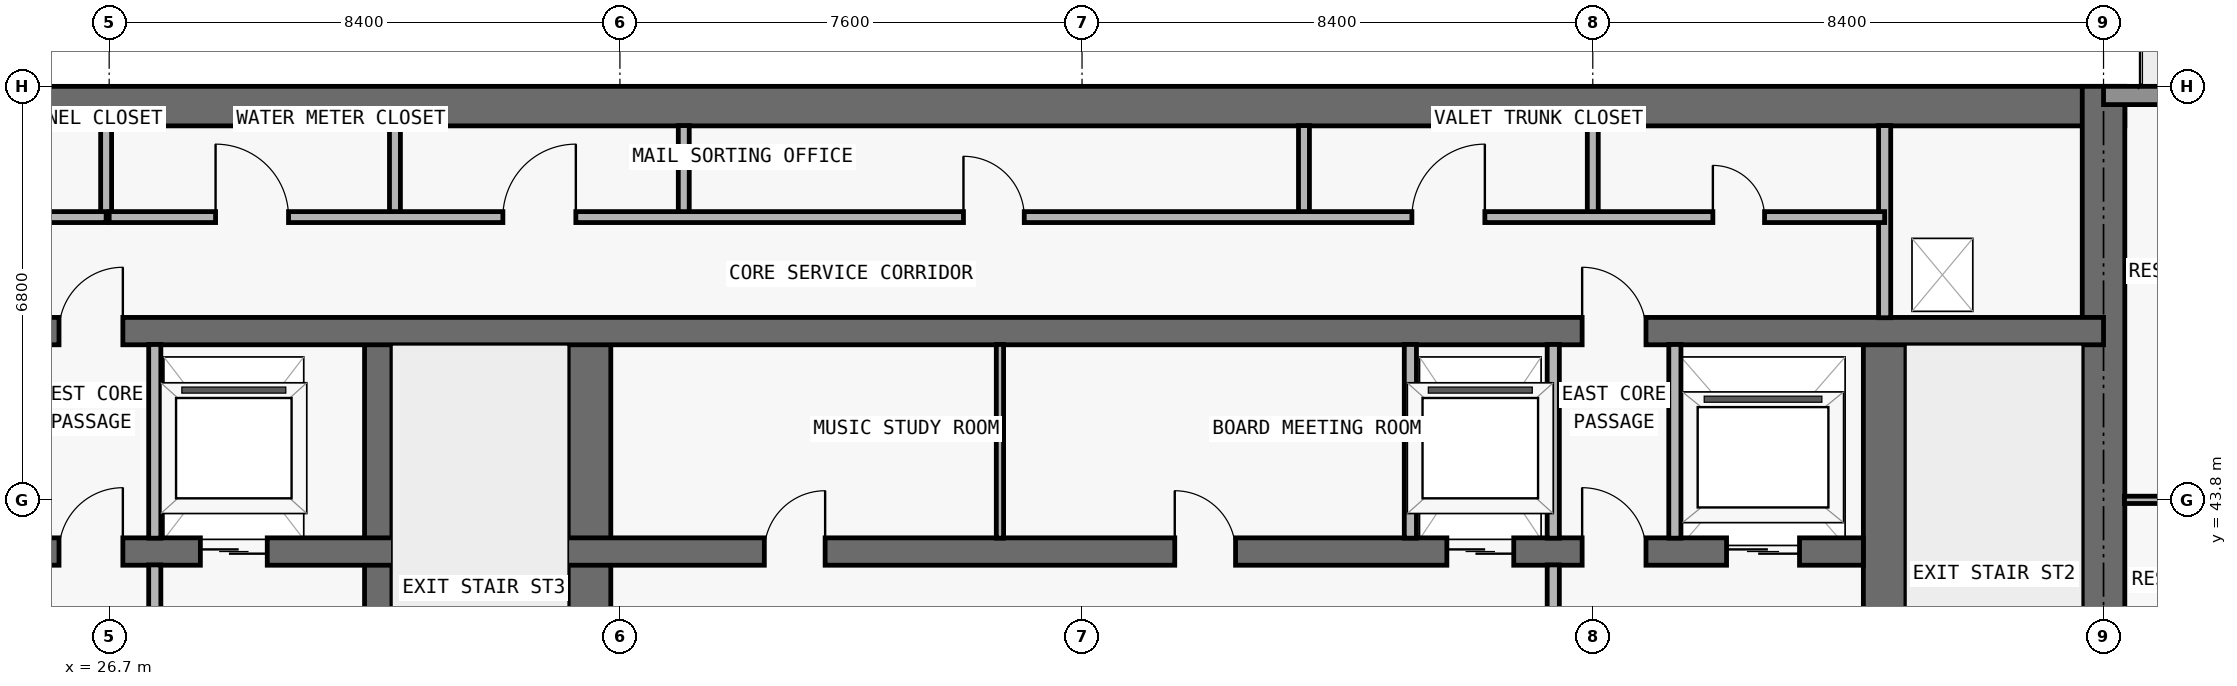
"""IFC4 building model, lengths in metres.
Left out: names, types, materials, properties, quantities, classifications, styles, units other than length and angle.
Written with IfcOpenShell. Run it as: python <this file> out.ifc"""

import sys

from ifc_helpers import new_model, si_unit, direction, frame, frame_2d, origin, place, context, subcontext, project, spatial, rectangle, extrude, element, fill, save


model = new_model("IFC4")
c1 = context("Model", 3, precision=1e-05, world=origin(), true_north=direction((0.0, 1.0)))
c2 = subcontext(c1, "Body", "Model", "MODEL_VIEW")
j1 = project(units=[si_unit("LENGTHUNIT", "METRE"), si_unit("PLANEANGLEUNIT", "RADIAN")], contexts=[c1])
p1 = place(None, origin())
s1 = spatial("IfcSite", under=j1, at=p1, CompositionType="ELEMENT")
p2 = place(p1, origin())
s2 = spatial("IfcBuilding", under=s1, at=p2, CompositionType="ELEMENT")
p3 = place(p2, frame((0.0, 0.0, 249.6)))
s3 = spatial("IfcBuildingStorey", under=s2, at=p3, CompositionType="ELEMENT", Elevation=249.6)
p4 = place(p3, frame((17.95, 50.275, 0.0), z_axis=(0.0, 0.0, 1.0), x_axis=(1.0, 0.0, 0.0)))
e1 = element("IfcWall", 1, at=p4, inside=s3, PredefinedType="SHEAR", context=c2, shape_type="SweptSolid", body=[
    extrude(rectangle(XDim=41.9, YDim=0.65, at=frame_2d((20.95, 0.0))), origin(), (0.0, 0.0, 1.0), 3.05),
])
p5 = place(p3, frame((59.5, 36.65, 0.0), z_axis=(0.0, 0.0, 1.0), x_axis=(0.0, 1.0, 0.0)))
e2 = element("IfcWall", 2, at=p5, inside=s3, PredefinedType="SHEAR", context=c2, shape_type="SweptSolid", body=[
    extrude(rectangle(XDim=13.95, YDim=0.7, at=frame_2d((6.975, 0.0))), origin(), (0.0, 0.0, 1.0), 3.05),
])
p6 = place(p3, frame((55.9, 37.0, 0.0), z_axis=(0.0, 0.0, 1.0), x_axis=(0.0, 1.0, 0.0)))
e3 = element("IfcWall", 3, at=p6, inside=s3, PredefinedType="SHEAR", context=c2, shape_type="SweptSolid", body=[
    extrude(rectangle(XDim=9.575, YDim=0.7, at=frame_2d((4.788, 0.0))), origin(), (0.0, 0.0, 1.0), 3.05),
])
p7 = place(p6, frame((0.55, 0.0, 0.0)))
e4 = element("IfcOpeningElement", 4, at=p7, cuts=e3, PredefinedType="OPENING", context=c2, shape_type="SweptSolid", body=[
    extrude(rectangle(XDim=1.1, YDim=2.15, at=frame_2d((0.55, 1.075))), frame((0.0, 0.36, 0.0), z_axis=(0.0, -1.0, 0.0), x_axis=(1.0, 0.0, 0.0)), (0.0, 0.0, 1.0), 0.72),
])
p8 = place(p3, frame((31.125, 37.0, 0.0), z_axis=(0.0, 0.0, 1.0), x_axis=(0.0, 1.0, 0.0)))
e5 = element("IfcWall", 5, at=p8, inside=s3, PredefinedType="SHEAR", context=c2, shape_type="SweptSolid", body=[
    extrude(rectangle(XDim=9.575, YDim=0.45, at=frame_2d((4.788, 0.0))), origin(), (0.0, 0.0, 1.0), 3.05),
])
p9 = place(p3, frame((34.6, 37.0, 0.0), z_axis=(0.0, 0.0, 1.0), x_axis=(0.0, 1.0, 0.0)))
e6 = element("IfcWall", 6, at=p9, inside=s3, PredefinedType="SHEAR", context=c2, shape_type="SweptSolid", body=[
    extrude(rectangle(XDim=9.575, YDim=0.7, at=frame_2d((4.788, 0.0))), origin(), (0.0, 0.0, 1.0), 3.05),
])
p10 = place(p3, frame((22.25, 42.95, 0.0), z_axis=(0.0, 0.0, 1.0), x_axis=(1.0, 0.0, 0.0)))
e7 = element("IfcWall", 7, at=p10, inside=s3, PredefinedType="SHEAR", context=c2, shape_type="SweptSolid", body=[
    extrude(rectangle(XDim=33.3, YDim=0.45, at=frame_2d((16.65, 0.0))), origin(), (0.0, 0.0, 1.0), 3.05),
])
p11 = place(p10, frame((1.05, 0.0, 0.0)))
e8 = element("IfcOpeningElement", 8, at=p11, cuts=e7, PredefinedType="OPENING", context=c2, shape_type="SweptSolid", body=[
    extrude(rectangle(XDim=1.2, YDim=2.2, at=frame_2d((0.6, 1.1))), frame((0.0, 0.235, 0.0), z_axis=(0.0, -1.0, 0.0), x_axis=(1.0, 0.0, 0.0)), (0.0, 0.0, 1.0), 0.47),
])
p12 = place(p10, frame((31.05, 0.0, 0.0)))
e9 = element("IfcOpeningElement", 9, at=p12, cuts=e7, PredefinedType="OPENING", context=c2, shape_type="SweptSolid", body=[
    extrude(rectangle(XDim=1.2, YDim=2.2, at=frame_2d((0.6, 1.1))), frame((0.0, 0.235, 0.0), z_axis=(0.0, -1.0, 0.0), x_axis=(1.0, 0.0, 0.0)), (0.0, 0.0, 1.0), 0.47),
])
p13 = place(p10, frame((26.45, 0.0, 0.0)))
e10 = element("IfcOpeningElement", 10, at=p13, cuts=e7, PredefinedType="OPENING", context=c2, shape_type="SweptSolid", body=[
    extrude(rectangle(XDim=1.1, YDim=2.2, at=frame_2d((0.55, 1.1))), frame((0.0, 0.235, 0.0), z_axis=(0.0, -1.0, 0.0), x_axis=(1.0, 0.0, 0.0)), (0.0, 0.0, 1.0), 0.47),
])
p14 = place(p10, frame((5.95, 0.0, 0.0)))
e11 = element("IfcOpeningElement", 11, at=p14, cuts=e7, PredefinedType="OPENING", context=c2, shape_type="SweptSolid", body=[
    extrude(rectangle(XDim=1.1, YDim=2.2, at=frame_2d((0.55, 1.1))), frame((0.0, 0.235, 0.0), z_axis=(0.0, -1.0, 0.0), x_axis=(1.0, 0.0, 0.0)), (0.0, 0.0, 1.0), 0.47),
])
p15 = place(p10, frame((3.625, 0.0, 0.0)))
e12 = element("IfcOpeningElement", 12, at=p15, cuts=e7, PredefinedType="OPENING", context=c2, shape_type="SweptSolid", body=[
    extrude(rectangle(XDim=1.05, YDim=2.15, at=frame_2d((0.525, 1.075))), frame((0.0, 0.235, 0.0), z_axis=(0.0, -1.0, 0.0), x_axis=(1.0, 0.0, 0.0)), (0.0, 0.0, 1.0), 0.47),
])
p16 = place(p10, frame((28.675, 0.0, 0.0)))
e13 = element("IfcOpeningElement", 13, at=p16, cuts=e7, PredefinedType="OPENING", context=c2, shape_type="SweptSolid", body=[
    extrude(rectangle(XDim=1.05, YDim=2.15, at=frame_2d((0.525, 1.075))), frame((0.0, 0.235, 0.0), z_axis=(0.0, -1.0, 0.0), x_axis=(1.0, 0.0, 0.0)), (0.0, 0.0, 1.0), 0.47),
])
p17 = place(p10, frame((15.225, 0.0, 0.0)))
e14 = element("IfcOpeningElement", 14, at=p17, cuts=e7, PredefinedType="OPENING", context=c2, shape_type="SweptSolid", body=[
    extrude(rectangle(XDim=1.0, YDim=2.2, at=frame_2d((0.5, 1.1))), frame((0.0, 0.235, 0.0), z_axis=(0.0, -1.0, 0.0), x_axis=(1.0, 0.0, 0.0)), (0.0, 0.0, 1.0), 0.47),
])
p18 = place(p10, frame((21.975, 0.0, 0.0)))
e15 = element("IfcOpeningElement", 15, at=p18, cuts=e7, PredefinedType="OPENING", context=c2, shape_type="SweptSolid", body=[
    extrude(rectangle(XDim=1.0, YDim=2.2, at=frame_2d((0.5, 1.1))), frame((0.0, 0.235, 0.0), z_axis=(0.0, -1.0, 0.0), x_axis=(1.0, 0.0, 0.0)), (0.0, 0.0, 1.0), 0.47),
])
p19 = place(p3, frame((18.3, 46.575, 0.0), z_axis=(0.0, 0.0, 1.0), x_axis=(1.0, 0.0, 0.0)))
e16 = element("IfcWall", 16, at=p19, inside=s3, PredefinedType="SHEAR", context=c2, shape_type="SweptSolid", body=[
    extrude(rectangle(XDim=41.2, YDim=0.45, at=frame_2d((20.6, 0.0))), origin(), (0.0, 0.0, 1.0), 3.05),
])
p20 = place(p19, frame((7.575, 0.0, 0.0)))
e17 = element("IfcOpeningElement", 17, at=p20, cuts=e16, PredefinedType="OPENING", context=c2, shape_type="SweptSolid", body=[
    extrude(rectangle(XDim=1.05, YDim=2.15, at=frame_2d((0.525, 1.075))), frame((0.0, 0.235, 0.0), z_axis=(0.0, -1.0, 0.0), x_axis=(1.0, 0.0, 0.0)), (0.0, 0.0, 1.0), 0.47),
])
p21 = place(p19, frame((32.625, 0.0, 0.0)))
e18 = element("IfcOpeningElement", 18, at=p21, cuts=e16, PredefinedType="OPENING", context=c2, shape_type="SweptSolid", body=[
    extrude(rectangle(XDim=1.05, YDim=2.15, at=frame_2d((0.525, 1.075))), frame((0.0, 0.235, 0.0), z_axis=(0.0, -1.0, 0.0), x_axis=(1.0, 0.0, 0.0)), (0.0, 0.0, 1.0), 0.47),
])
p22 = place(p3, frame((59.5, 50.45, 0.0), z_axis=(0.0, 0.0, 1.0), x_axis=(1.0, 0.0, 0.0)))
e19 = element("IfcWall", 19, at=p22, inside=s3, PredefinedType="STANDARD", context=c2, shape_type="SweptSolid", body=[
    extrude(rectangle(XDim=6.2, YDim=0.3, at=frame_2d((3.1, 0.0))), origin(), (0.0, 0.0, 1.0), 3.05),
])
p23 = place(p22, frame((2.1, 0.0, 0.0)))
e20 = element("IfcOpeningElement", 20, at=p23, cuts=e19, PredefinedType="OPENING", context=c2, shape_type="SweptSolid", body=[
    extrude(rectangle(XDim=2.0, YDim=2.3, at=frame_2d((1.0, 1.15))), frame((0.0, 0.16, 0.0), z_axis=(0.0, -1.0, 0.0), x_axis=(1.0, 0.0, 0.0)), (0.0, 0.0, 1.0), 0.32),
])
p24 = place(p3, frame((26.65, 48.45, 0.0), z_axis=(0.0, 0.0, 1.0), x_axis=(0.0, 1.0, 0.0)))
e21 = element("IfcWall", 21, at=p24, inside=s3, PredefinedType="PARTITIONING", context=c2, shape_type="SweptSolid", body=[
    extrude(rectangle(XDim=1.505, YDim=0.18, at=frame_2d((0.752, 0.0))), origin(), (0.0, 0.0, 1.0), 3.05),
])
p25 = place(p3, frame((27.45, 37.345, 0.0), z_axis=(0.0, 0.0, 1.0), x_axis=(0.0, 1.0, 0.0)))
e22 = element("IfcWall", 22, at=p25, inside=s3, PredefinedType="PARTITIONING", context=c2, shape_type="SweptSolid", body=[
    extrude(rectangle(XDim=5.385, YDim=0.2, at=frame_2d((2.692, 0.0))), origin(), (0.0, 0.0, 1.0), 3.05),
])
p26 = place(p3, frame((27.45, 43.17, 0.0), z_axis=(0.0, 0.0, 1.0), x_axis=(0.0, 1.0, 0.0)))
e23 = element("IfcWall", 23, at=p26, inside=s3, PredefinedType="PARTITIONING", context=c2, shape_type="SweptSolid", body=[
    extrude(rectangle(XDim=3.185, YDim=0.2, at=frame_2d((1.593, 0.0))), origin(), (0.0, 0.0, 1.0), 3.05),
])
for number, where, z_axis, x_axis in (
    (24, (31.4, 48.45, 0.0), (0.0, 0.0, 1.0), (0.0, 1.0, 0.0)),
    (25, (36.15, 48.45, 0.0), (0.0, 0.0, 1.0), (0.0, 1.0, 0.0)),
):
    element("IfcWall", number, at=place(p3, frame(where, z_axis=z_axis, x_axis=x_axis)), inside=s3, PredefinedType="PARTITIONING", context=c2, shape_type="SweptSolid", body=[
        extrude(rectangle(XDim=1.505, YDim=0.18, at=frame_2d((0.752, 0.0))), origin(), (0.0, 0.0, 1.0), 3.05),
    ])
p27 = place(p3, frame((41.35, 43.17, 0.0), z_axis=(0.0, 0.0, 1.0), x_axis=(0.0, 1.0, 0.0)))
e26 = element("IfcWall", 26, at=p27, inside=s3, PredefinedType="PARTITIONING", context=c2, shape_type="SweptSolid", body=[
    extrude(rectangle(XDim=3.185, YDim=0.12, at=frame_2d((1.593, 0.0))), origin(), (0.0, 0.0, 1.0), 3.05),
])
p28 = place(p3, frame((46.35, 48.45, 0.0), z_axis=(0.0, 0.0, 1.0), x_axis=(0.0, 1.0, 0.0)))
e27 = element("IfcWall", 27, at=p28, inside=s3, PredefinedType="PARTITIONING", context=c2, shape_type="SweptSolid", body=[
    extrude(rectangle(XDim=1.505, YDim=0.18, at=frame_2d((0.752, 0.0))), origin(), (0.0, 0.0, 1.0), 3.05),
])
p29 = place(p3, frame((48.1, 43.17, 0.0), z_axis=(0.0, 0.0, 1.0), x_axis=(0.0, 1.0, 0.0)))
e28 = element("IfcWall", 28, at=p29, inside=s3, PredefinedType="PARTITIONING", context=c2, shape_type="SweptSolid", body=[
    extrude(rectangle(XDim=3.185, YDim=0.2, at=frame_2d((1.593, 0.0))), origin(), (0.0, 0.0, 1.0), 3.05),
])
p30 = place(p3, frame((50.45, 37.345, 0.0), z_axis=(0.0, 0.0, 1.0), x_axis=(0.0, 1.0, 0.0)))
e29 = element("IfcWall", 29, at=p30, inside=s3, PredefinedType="PARTITIONING", context=c2, shape_type="SweptSolid", body=[
    extrude(rectangle(XDim=5.385, YDim=0.2, at=frame_2d((2.692, 0.0))), origin(), (0.0, 0.0, 1.0), 3.05),
])
p31 = place(p3, frame((50.45, 43.17, 0.0), z_axis=(0.0, 0.0, 1.0), x_axis=(0.0, 1.0, 0.0)))
e30 = element("IfcWall", 30, at=p31, inside=s3, PredefinedType="PARTITIONING", context=c2, shape_type="SweptSolid", body=[
    extrude(rectangle(XDim=3.185, YDim=0.2, at=frame_2d((1.593, 0.0))), origin(), (0.0, 0.0, 1.0), 3.05),
])
p32 = place(p3, frame((51.1, 48.45, 0.0), z_axis=(0.0, 0.0, 1.0), x_axis=(0.0, 1.0, 0.0)))
e31 = element("IfcWall", 31, at=p32, inside=s3, PredefinedType="PARTITIONING", context=c2, shape_type="SweptSolid", body=[
    extrude(rectangle(XDim=1.505, YDim=0.18, at=frame_2d((0.752, 0.0))), origin(), (0.0, 0.0, 1.0), 3.05),
])
p33 = place(p3, frame((52.45, 43.17, 0.0), z_axis=(0.0, 0.0, 1.0), x_axis=(0.0, 1.0, 0.0)))
e32 = element("IfcWall", 32, at=p33, inside=s3, PredefinedType="PARTITIONING", context=c2, shape_type="SweptSolid", body=[
    extrude(rectangle(XDim=3.185, YDim=0.2, at=frame_2d((1.593, 0.0))), origin(), (0.0, 0.0, 1.0), 3.05),
])
p34 = place(p3, frame((55.9, 46.795, 0.0), z_axis=(0.0, 0.0, 1.0), x_axis=(0.0, 1.0, 0.0)))
e33 = element("IfcWall", 33, at=p34, inside=s3, PredefinedType="PARTITIONING", context=c2, shape_type="SweptSolid", body=[
    extrude(rectangle(XDim=3.16, YDim=0.2, at=frame_2d((1.58, 0.0))), origin(), (0.0, 0.0, 1.0), 3.05),
])
p35 = place(p3, frame((59.845, 43.8, 0.0), z_axis=(0.0, 0.0, 1.0), x_axis=(1.0, 0.0, 0.0)))
e34 = element("IfcWall", 34, at=p35, inside=s3, PredefinedType="PARTITIONING", context=c2, shape_type="SweptSolid", body=[
    extrude(rectangle(XDim=9.56, YDim=0.12, at=frame_2d((4.78, 0.0))), origin(), (0.0, 0.0, 1.0), 2.418),
])
p36 = place(p35, frame((3.63, 0.0, 0.0)))
e35 = element("IfcOpeningElement", 35, at=p36, cuts=e34, PredefinedType="OPENING", context=c2, shape_type="SweptSolid", body=[
    extrude(rectangle(XDim=0.9, YDim=2.15, at=frame_2d((0.45, 1.075))), frame((0.0, 0.07, 0.0), z_axis=(0.0, -1.0, 0.0), x_axis=(1.0, 0.0, 0.0)), (0.0, 0.0, 1.0), 0.14),
])
p37 = place(p35, frame((0.728, 0.0, 0.0)))
e36 = element("IfcOpeningElement", 36, at=p37, cuts=e34, PredefinedType="OPENING", context=c2, shape_type="SweptSolid", body=[
    extrude(rectangle(XDim=0.85, YDim=2.1, at=frame_2d((0.425, 1.05))), frame((0.0, 0.07, 0.0), z_axis=(0.0, -1.0, 0.0), x_axis=(1.0, 0.0, 0.0)), (0.0, 0.0, 1.0), 0.14),
])
p38 = place(p3, frame((21.9, 48.45, 0.0), z_axis=(0.0, 0.0, 1.0), x_axis=(1.0, 0.0, 0.0)))
e37 = element("IfcWall", 37, at=p38, inside=s3, PredefinedType="PARTITIONING", context=c2, shape_type="SweptSolid", body=[
    extrude(rectangle(XDim=4.75, YDim=0.18, at=frame_2d((2.375, 0.0))), origin(), (0.0, 0.0, 1.0), 3.05),
])
p39 = place(p38, frame((1.775, 0.0, 0.0)))
e38 = element("IfcOpeningElement", 38, at=p39, cuts=e37, PredefinedType="OPENING", context=c2, shape_type="SweptSolid", body=[
    extrude(rectangle(XDim=1.2, YDim=2.2, at=frame_2d((0.6, 1.1))), frame((0.0, 0.1, 0.0), z_axis=(0.0, -1.0, 0.0), x_axis=(1.0, 0.0, 0.0)), (0.0, 0.0, 1.0), 0.2),
])
p40 = place(p3, frame((26.7, 48.45, 0.0), z_axis=(0.0, 0.0, 1.0), x_axis=(1.0, 0.0, 0.0)))
e39 = element("IfcWall", 39, at=p40, inside=s3, PredefinedType="PARTITIONING", context=c2, shape_type="SweptSolid", body=[
    extrude(rectangle(XDim=29.2, YDim=0.18, at=frame_2d((14.6, 0.0))), origin(), (0.0, 0.0, 1.0), 3.05),
])
p41 = place(p40, frame((1.75, 0.0, 0.0)))
e40 = element("IfcOpeningElement", 40, at=p41, cuts=e39, PredefinedType="OPENING", context=c2, shape_type="SweptSolid", body=[
    extrude(rectangle(XDim=1.2, YDim=2.2, at=frame_2d((0.6, 1.1))), frame((0.0, 0.1, 0.0), z_axis=(0.0, -1.0, 0.0), x_axis=(1.0, 0.0, 0.0)), (0.0, 0.0, 1.0), 0.2),
])
p42 = place(p40, frame((6.475, 0.0, 0.0)))
e41 = element("IfcOpeningElement", 41, at=p42, cuts=e39, PredefinedType="OPENING", context=c2, shape_type="SweptSolid", body=[
    extrude(rectangle(XDim=1.2, YDim=2.2, at=frame_2d((0.6, 1.1))), frame((0.0, 0.1, 0.0), z_axis=(0.0, -1.0, 0.0), x_axis=(1.0, 0.0, 0.0)), (0.0, 0.0, 1.0), 0.2),
])
p43 = place(p40, frame((14.05, 0.0, 0.0)))
e42 = element("IfcOpeningElement", 42, at=p43, cuts=e39, PredefinedType="OPENING", context=c2, shape_type="SweptSolid", body=[
    extrude(rectangle(XDim=1.0, YDim=2.2, at=frame_2d((0.5, 1.1))), frame((0.0, 0.1, 0.0), z_axis=(0.0, -1.0, 0.0), x_axis=(1.0, 0.0, 0.0)), (0.0, 0.0, 1.0), 0.2),
])
p44 = place(p40, frame((21.425, 0.0, 0.0)))
e43 = element("IfcOpeningElement", 43, at=p44, cuts=e39, PredefinedType="OPENING", context=c2, shape_type="SweptSolid", body=[
    extrude(rectangle(XDim=1.2, YDim=2.2, at=frame_2d((0.6, 1.1))), frame((0.0, 0.1, 0.0), z_axis=(0.0, -1.0, 0.0), x_axis=(1.0, 0.0, 0.0)), (0.0, 0.0, 1.0), 0.2),
])
p45 = place(p40, frame((26.375, 0.0, 0.0)))
e44 = element("IfcOpeningElement", 44, at=p45, cuts=e39, PredefinedType="OPENING", context=c2, shape_type="SweptSolid", body=[
    extrude(rectangle(XDim=0.85, YDim=2.1, at=frame_2d((0.425, 1.05))), frame((0.0, 0.1, 0.0), z_axis=(0.0, -1.0, 0.0), x_axis=(1.0, 0.0, 0.0)), (0.0, 0.0, 1.0), 0.2),
])
p46 = place(p12, origin())
e45 = element("IfcDoor", 45, at=p46, inside=s3, OperationType="DOUBLE_DOOR_SLIDING", PredefinedType="DOOR", context=c2, shape_type="SweptSolid", body=[
    extrude(rectangle(XDim=1.2, YDim=2.2, at=frame_2d((0.6, 1.1))), frame((0.0, 0.025, 0.0), z_axis=(0.0, -1.0, 0.0), x_axis=(1.0, 0.0, 0.0)), (0.0, 0.0, 1.0), 0.05),
])
fill(e9, e45)
p47 = place(p13, origin())
e46 = element("IfcDoor", 46, at=p47, inside=s3, OperationType="DOUBLE_DOOR_SLIDING", PredefinedType="DOOR", context=c2, shape_type="SweptSolid", body=[
    extrude(rectangle(XDim=1.1, YDim=2.2, at=frame_2d((0.55, 1.1))), frame((0.0, 0.025, 0.0), z_axis=(0.0, -1.0, 0.0), x_axis=(1.0, 0.0, 0.0)), (0.0, 0.0, 1.0), 0.05),
])
fill(e10, e46)
p48 = place(p14, origin())
e47 = element("IfcDoor", 47, at=p48, inside=s3, OperationType="DOUBLE_DOOR_SLIDING", PredefinedType="DOOR", context=c2, shape_type="SweptSolid", body=[
    extrude(rectangle(XDim=1.1, YDim=2.2, at=frame_2d((0.55, 1.1))), frame((0.0, 0.025, 0.0), z_axis=(0.0, -1.0, 0.0), x_axis=(1.0, 0.0, 0.0)), (0.0, 0.0, 1.0), 0.05),
])
fill(e11, e47)
p49 = place(p15, origin())
e48 = element("IfcDoor", 48, at=p49, inside=s3, OperationType="SINGLE_SWING_RIGHT", PredefinedType="DOOR", context=c2, shape_type="SweptSolid", body=[
    extrude(rectangle(XDim=1.05, YDim=2.15, at=frame_2d((0.525, 1.075))), frame((0.0, 0.025, 0.0), z_axis=(0.0, -1.0, 0.0), x_axis=(1.0, 0.0, 0.0)), (0.0, 0.0, 1.0), 0.05),
])
fill(e12, e48)
p50 = place(p16, origin())
e49 = element("IfcDoor", 49, at=p50, inside=s3, OperationType="SINGLE_SWING_LEFT", PredefinedType="DOOR", context=c2, shape_type="SweptSolid", body=[
    extrude(rectangle(XDim=1.05, YDim=2.15, at=frame_2d((0.525, 1.075))), frame((0.0, 0.025, 0.0), z_axis=(0.0, -1.0, 0.0), x_axis=(1.0, 0.0, 0.0)), (0.0, 0.0, 1.0), 0.05),
])
fill(e13, e49)
p51 = place(p17, origin())
e50 = element("IfcDoor", 50, at=p51, inside=s3, OperationType="SINGLE_SWING_RIGHT", PredefinedType="DOOR", context=c2, shape_type="SweptSolid", body=[
    extrude(rectangle(XDim=1.0, YDim=2.2, at=frame_2d((0.5, 1.1))), frame((0.0, 0.025, 0.0), z_axis=(0.0, -1.0, 0.0), x_axis=(1.0, 0.0, 0.0)), (0.0, 0.0, 1.0), 0.05),
])
fill(e14, e50)
p52 = place(p18, origin())
e51 = element("IfcDoor", 51, at=p52, inside=s3, OperationType="SINGLE_SWING_LEFT", PredefinedType="DOOR", context=c2, shape_type="SweptSolid", body=[
    extrude(rectangle(XDim=1.0, YDim=2.2, at=frame_2d((0.5, 1.1))), frame((0.0, 0.025, 0.0), z_axis=(0.0, -1.0, 0.0), x_axis=(1.0, 0.0, 0.0)), (0.0, 0.0, 1.0), 0.05),
])
fill(e15, e51)
p53 = place(p20, origin())
e52 = element("IfcDoor", 52, at=p53, inside=s3, OperationType="SINGLE_SWING_RIGHT", PredefinedType="DOOR", context=c2, shape_type="SweptSolid", body=[
    extrude(rectangle(XDim=1.05, YDim=2.15, at=frame_2d((0.525, 1.075))), frame((0.0, 0.025, 0.0), z_axis=(0.0, -1.0, 0.0), x_axis=(1.0, 0.0, 0.0)), (0.0, 0.0, 1.0), 0.05),
])
fill(e17, e52)
p54 = place(p21, origin())
e53 = element("IfcDoor", 53, at=p54, inside=s3, OperationType="SINGLE_SWING_LEFT", PredefinedType="DOOR", context=c2, shape_type="SweptSolid", body=[
    extrude(rectangle(XDim=1.05, YDim=2.15, at=frame_2d((0.525, 1.075))), frame((0.0, 0.025, 0.0), z_axis=(0.0, -1.0, 0.0), x_axis=(1.0, 0.0, 0.0)), (0.0, 0.0, 1.0), 0.05),
])
fill(e18, e53)
p55 = place(p41, origin())
e54 = element("IfcDoor", 54, at=p55, inside=s3, OperationType="SINGLE_SWING_LEFT", PredefinedType="DOOR", context=c2, shape_type="SweptSolid", body=[
    extrude(rectangle(XDim=1.2, YDim=2.2, at=frame_2d((0.6, 1.1))), frame((0.0, 0.025, 0.0), z_axis=(0.0, -1.0, 0.0), x_axis=(1.0, 0.0, 0.0)), (0.0, 0.0, 1.0), 0.05),
])
fill(e40, e54)
p56 = place(p42, origin())
e55 = element("IfcDoor", 55, at=p56, inside=s3, OperationType="SINGLE_SWING_RIGHT", PredefinedType="DOOR", context=c2, shape_type="SweptSolid", body=[
    extrude(rectangle(XDim=1.2, YDim=2.2, at=frame_2d((0.6, 1.1))), frame((0.0, 0.025, 0.0), z_axis=(0.0, -1.0, 0.0), x_axis=(1.0, 0.0, 0.0)), (0.0, 0.0, 1.0), 0.05),
])
fill(e41, e55)
p57 = place(p43, origin())
e56 = element("IfcDoor", 56, at=p57, inside=s3, OperationType="SINGLE_SWING_LEFT", PredefinedType="DOOR", context=c2, shape_type="SweptSolid", body=[
    extrude(rectangle(XDim=1.0, YDim=2.2, at=frame_2d((0.5, 1.1))), frame((0.0, 0.025, 0.0), z_axis=(0.0, -1.0, 0.0), x_axis=(1.0, 0.0, 0.0)), (0.0, 0.0, 1.0), 0.05),
])
fill(e42, e56)
p58 = place(p44, origin())
e57 = element("IfcDoor", 57, at=p58, inside=s3, OperationType="SINGLE_SWING_RIGHT", PredefinedType="DOOR", context=c2, shape_type="SweptSolid", body=[
    extrude(rectangle(XDim=1.2, YDim=2.2, at=frame_2d((0.6, 1.1))), frame((0.0, 0.025, 0.0), z_axis=(0.0, -1.0, 0.0), x_axis=(1.0, 0.0, 0.0)), (0.0, 0.0, 1.0), 0.05),
])
fill(e43, e57)
p59 = place(p45, origin())
e58 = element("IfcDoor", 58, at=p59, inside=s3, OperationType="SINGLE_SWING_LEFT", PredefinedType="DOOR", context=c2, shape_type="SweptSolid", body=[
    extrude(rectangle(XDim=0.85, YDim=2.1, at=frame_2d((0.425, 1.05))), frame((0.0, 0.025, 0.0), z_axis=(0.0, -1.0, 0.0), x_axis=(1.0, 0.0, 0.0)), (0.0, 0.0, 1.0), 0.05),
])
fill(e44, e58)
save(model, sys.argv[1])
